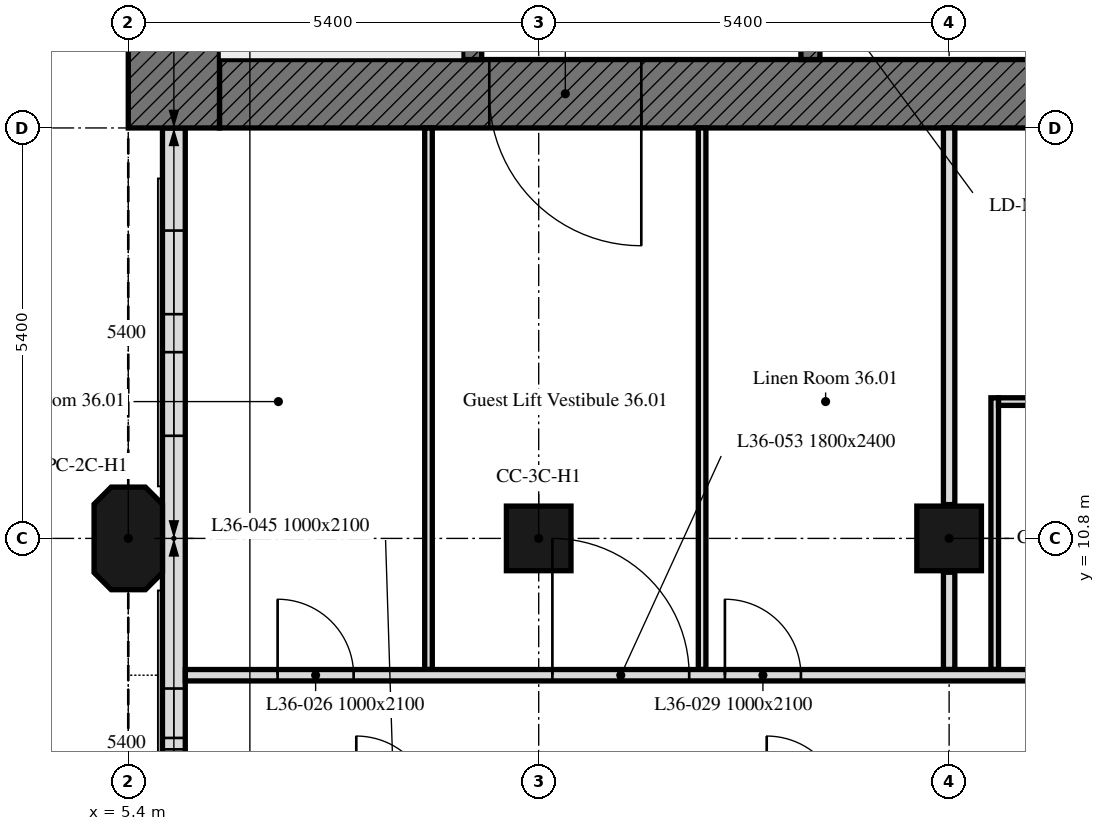
"""IFC4 building model, lengths in metres.
Left out: names, types, materials, properties, quantities, classifications, styles, units other than length and angle.
Written with IfcOpenShell. Run it as: python <this file> out.ifc"""

import sys

from ifc_helpers import new_model, si_unit, direction, frame, frame_2d, origin, origin_2d, place, context, subcontext, project, spatial, polyline, rectangle, outline, extrude, element, fill, save


model = new_model("IFC4")
c1 = context("Model", 3, precision=1e-05, world=origin(), true_north=direction((0.0, 1.0)))
c2 = subcontext(c1, "Body", "Model", "MODEL_VIEW")
j1 = project(units=[si_unit("LENGTHUNIT", "METRE"), si_unit("PLANEANGLEUNIT", "RADIAN")], contexts=[c1])
p1 = place(None, origin())
s1 = spatial("IfcSite", under=j1, at=p1, CompositionType="ELEMENT")
p2 = place(p1, origin())
s2 = spatial("IfcBuilding", under=s1, at=p2, CompositionType="ELEMENT")
p3 = place(p2, frame((0.0, 0.0, 156.1)))
s3 = spatial("IfcBuildingStorey", under=s2, at=p3, CompositionType="ELEMENT", Elevation=156.1)
p4 = place(p3, frame((5.4, 10.8, 0.0), z_axis=(0.0, 0.0, 1.0), x_axis=(0.0, 1.0, 0.0)))
e1 = element("IfcColumn", 1, at=p4, inside=s3, PredefinedType="COLUMN", context=c2, shape_type="SweptSolid", body=[
    extrude(outline(polyline([(-0.45, -0.45), (0.45, -0.45), (0.675, -0.225), (0.675, 0.225), (0.45, 0.45), (-0.45, 0.45), (-0.675, 0.225), (-0.675, -0.225), (-0.45, -0.45)])), origin(), (0.0, 0.0, 1.0), 3.0),
])
for number, where, z_axis, x_axis in (
    (2, (10.8, 10.8, 0.0), (0.0, 0.0, 1.0), (1.0, 0.0, 0.0)),
    (3, (16.2, 10.8, 0.0), (0.0, 0.0, 1.0), (1.0, 0.0, 0.0)),
):
    element("IfcColumn", number, at=place(p3, frame(where, z_axis=z_axis, x_axis=x_axis)), inside=s3, PredefinedType="COLUMN", context=c2, shape_type="SweptSolid", body=[
        extrude(rectangle(XDim=0.85, YDim=0.85, at=origin_2d()), origin(), (0.0, 0.0, 1.0), 3.0),
    ])
p5 = place(p3, frame((6.0, 16.2, 0.0), z_axis=(0.0, 0.0, 1.0), x_axis=(0.0, -1.0, 0.0)))
e4 = element("IfcWall", 4, at=p5, inside=s3, PredefinedType="SOLIDWALL", context=c2, shape_type="SweptSolid", body=[
    extrude(rectangle(XDim=10.614, YDim=0.3, at=frame_2d((5.307, 0.0))), origin(), (0.0, 0.0, 1.0), 3.0),
])
p6 = place(p5, frame((1.35, 0.0, 0.9)))
e5 = element("IfcOpeningElement", 5, at=p6, cuts=e4, PredefinedType="OPENING", context=c2, shape_type="SweptSolid", body=[
    extrude(rectangle(XDim=1.1, YDim=1.7, at=frame_2d((0.55, 0.85))), frame((0.0, 0.16, 0.0), z_axis=(0.0, -1.0, 0.0), x_axis=(1.0, 0.0, 0.0)), (0.0, 0.0, 1.0), 0.32),
])
p7 = place(p5, frame((2.95, 0.0, 0.9)))
e6 = element("IfcOpeningElement", 6, at=p7, cuts=e4, PredefinedType="OPENING", context=c2, shape_type="SweptSolid", body=[
    extrude(rectangle(XDim=1.1, YDim=1.7, at=frame_2d((0.55, 0.85))), frame((0.0, 0.16, 0.0), z_axis=(0.0, -1.0, 0.0), x_axis=(1.0, 0.0, 0.0)), (0.0, 0.0, 1.0), 0.32),
])
p8 = place(p5, frame((7.375, 0.0, 0.9)))
e7 = element("IfcOpeningElement", 7, at=p8, cuts=e4, PredefinedType="OPENING", context=c2, shape_type="SweptSolid", body=[
    extrude(rectangle(XDim=0.65, YDim=1.7, at=frame_2d((0.325, 0.85))), frame((0.0, 0.16, 0.0), z_axis=(0.0, -1.0, 0.0), x_axis=(1.0, 0.0, 0.0)), (0.0, 0.0, 1.0), 0.32),
])
p9 = place(p5, frame((8.175, 0.0, 0.9)))
e8 = element("IfcOpeningElement", 8, at=p9, cuts=e4, PredefinedType="OPENING", context=c2, shape_type="SweptSolid", body=[
    extrude(rectangle(XDim=0.65, YDim=1.7, at=frame_2d((0.325, 0.85))), frame((0.0, 0.16, 0.0), z_axis=(0.0, -1.0, 0.0), x_axis=(1.0, 0.0, 0.0)), (0.0, 0.0, 1.0), 0.32),
])
p10 = place(p3, frame((17.7, 16.65, 0.0), z_axis=(0.0, 0.0, 1.0), x_axis=(-1.0, 0.0, 0.0)))
e9 = element("IfcWall", 9, at=p10, inside=s3, PredefinedType="SOLIDWALL", context=c2, shape_type="SweptSolid", body=[
    extrude(rectangle(XDim=11.1, YDim=0.9, at=frame_2d((5.55, 0.0))), origin(), (0.0, 0.0, 1.0), 3.0),
])
p11 = place(p10, frame((5.55, 0.0, 0.0)))
e10 = element("IfcOpeningElement", 10, at=p11, cuts=e9, PredefinedType="OPENING", context=c2, shape_type="SweptSolid", body=[
    extrude(rectangle(XDim=2.0, YDim=2.4, at=frame_2d((1.0, 1.2))), frame((0.0, 0.45, 0.0), z_axis=(0.0, -1.0, 0.0), x_axis=(1.0, 0.0, 0.0)), (0.0, 0.0, 1.0), 0.9),
])
p12 = place(p3, frame((6.0, 16.2, 0.0), z_axis=(0.0, 0.0, 1.0), x_axis=(0.0, 1.0, 0.0)))
e11 = element("IfcWall", 11, at=p12, inside=s3, PredefinedType="SOLIDWALL", context=c2, shape_type="SweptSolid", body=[
    extrude(rectangle(XDim=16.2, YDim=1.2, at=frame_2d((8.1, 0.0))), origin(), (0.0, 0.0, 1.0), 3.0),
])
p13 = place(p3, frame((9.925, 17.1, 0.0), z_axis=(0.0, 0.0, 1.0), x_axis=(0.0, 1.0, 0.0)))
e12 = element("IfcWall", 12, at=p13, inside=s3, PredefinedType="SOLIDWALL", context=c2, shape_type="SweptSolid", body=[
    extrude(rectangle(XDim=14.4, YDim=0.25, at=frame_2d((7.2, 0.0))), origin(), (0.0, 0.0, 1.0), 3.0),
])
p14 = place(p13, frame((4.6, 0.0, 0.0)))
e13 = element("IfcOpeningElement", 13, at=p14, cuts=e12, PredefinedType="OPENING", context=c2, shape_type="SweptSolid", body=[
    extrude(rectangle(XDim=1.0, YDim=2.1, at=frame_2d((0.5, 1.05))), frame((0.0, 0.125, 0.0), z_axis=(0.0, -1.0, 0.0), x_axis=(1.0, 0.0, 0.0)), (0.0, 0.0, 1.0), 0.25),
])
p15 = place(p13, frame((7.062, 0.0, 0.0)))
e14 = element("IfcOpeningElement", 14, at=p15, cuts=e12, PredefinedType="OPENING", context=c2, shape_type="SweptSolid", body=[
    extrude(rectangle(XDim=1.2, YDim=2.1, at=frame_2d((0.6, 1.05))), frame((0.0, 0.125, 0.0), z_axis=(0.0, -1.0, 0.0), x_axis=(1.0, 0.0, 0.0)), (0.0, 0.0, 1.0), 0.25),
])
p16 = place(p13, frame((9.472, 0.0, 0.0)))
e15 = element("IfcOpeningElement", 15, at=p16, cuts=e12, PredefinedType="OPENING", context=c2, shape_type="SweptSolid", body=[
    extrude(rectangle(XDim=0.9, YDim=2.1, at=frame_2d((0.45, 1.05))), frame((0.0, 0.125, 0.0), z_axis=(0.0, -1.0, 0.0), x_axis=(1.0, 0.0, 0.0)), (0.0, 0.0, 1.0), 0.25),
])
p17 = place(p13, frame((11.159, 0.0, 0.0)))
e16 = element("IfcOpeningElement", 16, at=p17, cuts=e12, PredefinedType="OPENING", context=c2, shape_type="SweptSolid", body=[
    extrude(rectangle(XDim=0.9, YDim=2.1, at=frame_2d((0.45, 1.05))), frame((0.0, 0.125, 0.0), z_axis=(0.0, -1.0, 0.0), x_axis=(1.0, 0.0, 0.0)), (0.0, 0.0, 1.0), 0.25),
])
p18 = place(p13, frame((13.1, 0.0, 0.0)))
e17 = element("IfcOpeningElement", 17, at=p18, cuts=e12, PredefinedType="OPENING", context=c2, shape_type="SweptSolid", body=[
    extrude(rectangle(XDim=0.9, YDim=2.1, at=frame_2d((0.45, 1.05))), frame((0.0, 0.125, 0.0), z_axis=(0.0, -1.0, 0.0), x_axis=(1.0, 0.0, 0.0)), (0.0, 0.0, 1.0), 0.25),
])
p19 = place(p3, frame((14.375, 17.1, 0.0), z_axis=(0.0, 0.0, 1.0), x_axis=(0.0, 1.0, 0.0)))
e18 = element("IfcWall", 18, at=p19, inside=s3, PredefinedType="SOLIDWALL", context=c2, shape_type="SweptSolid", body=[
    extrude(rectangle(XDim=14.4, YDim=0.25, at=frame_2d((7.2, 0.0))), origin(), (0.0, 0.0, 1.0), 3.0),
])
p20 = place(p19, frame((13.15, 0.0, 0.0)))
e19 = element("IfcOpeningElement", 19, at=p20, cuts=e18, PredefinedType="OPENING", context=c2, shape_type="SweptSolid", body=[
    extrude(rectangle(XDim=1.0, YDim=2.1, at=frame_2d((0.5, 1.05))), frame((0.0, 0.125, 0.0), z_axis=(0.0, -1.0, 0.0), x_axis=(1.0, 0.0, 0.0)), (0.0, 0.0, 1.0), 0.25),
])
p21 = place(p19, frame((0.6, 0.0, 0.0)))
e20 = element("IfcOpeningElement", 20, at=p21, cuts=e18, PredefinedType="OPENING", context=c2, shape_type="SweptSolid", body=[
    extrude(rectangle(XDim=1.1, YDim=2.1, at=frame_2d((0.55, 1.05))), frame((0.0, 0.125, 0.0), z_axis=(0.0, -1.0, 0.0), x_axis=(1.0, 0.0, 0.0)), (0.0, 0.0, 1.0), 0.25),
])
p22 = place(p19, frame((3.25, 0.0, 0.0)))
e21 = element("IfcOpeningElement", 21, at=p22, cuts=e18, PredefinedType="OPENING", context=c2, shape_type="SweptSolid", body=[
    extrude(rectangle(XDim=0.9, YDim=2.1, at=frame_2d((0.45, 1.05))), frame((0.0, 0.125, 0.0), z_axis=(0.0, -1.0, 0.0), x_axis=(1.0, 0.0, 0.0)), (0.0, 0.0, 1.0), 0.25),
])
p23 = place(p3, frame((16.2, 16.2, 0.0), z_axis=(0.0, 0.0, 1.0), x_axis=(0.0, -1.0, 0.0)))
e22 = element("IfcWall", 22, at=p23, inside=s3, PredefinedType="PARTITIONING", context=c2, shape_type="SweptSolid", body=[
    extrude(rectangle(XDim=4.955, YDim=0.15, at=frame_2d((2.478, 0.0))), origin(), (0.0, 0.0, 1.0), 2.4),
])
p24 = place(p3, frame((16.2, 10.355, 0.0), z_axis=(0.0, 0.0, 1.0), x_axis=(0.0, -1.0, 0.0)))
e23 = element("IfcWall", 23, at=p24, inside=s3, PredefinedType="PARTITIONING", context=c2, shape_type="SweptSolid", body=[
    extrude(rectangle(XDim=1.28, YDim=0.15, at=frame_2d((0.64, 0.0))), origin(), (0.0, 0.0, 1.0), 2.4),
])
p25 = place(p3, frame((16.8, 9.075, 0.0), z_axis=(0.0, 0.0, 1.0), x_axis=(0.0, 1.0, 0.0)))
e24 = element("IfcWall", 24, at=p25, inside=s3, PredefinedType="PARTITIONING", context=c2, shape_type="SweptSolid", body=[
    extrude(rectangle(XDim=3.575, YDim=0.1, at=frame_2d((1.788, 0.0))), origin(), (0.0, 0.0, 1.0), 3.0),
])
p26 = place(p3, frame((16.85, 12.6, 0.0), z_axis=(0.0, 0.0, 1.0), x_axis=(1.0, 0.0, 0.0)))
e25 = element("IfcWall", 25, at=p26, inside=s3, PredefinedType="PARTITIONING", context=c2, shape_type="SweptSolid", body=[
    extrude(rectangle(XDim=2.1, YDim=0.1, at=frame_2d((1.05, 0.0))), origin(), (0.0, 0.0, 1.0), 3.0),
])
for number, where, z_axis, x_axis in (
    (26, (9.35, 16.2, 0.0), (0.0, 0.0, 1.0), (0.0, -1.0, 0.0)),
    (27, (12.95, 9.075, 0.0), (0.0, 0.0, 1.0), (0.0, 1.0, 0.0)),
):
    element("IfcWall", number, at=place(p3, frame(where, z_axis=z_axis, x_axis=x_axis)), inside=s3, PredefinedType="PARTITIONING", context=c2, shape_type="SweptSolid", body=[
        extrude(rectangle(XDim=7.125, YDim=0.1, at=frame_2d((3.562, 0.0))), origin(), (0.0, 0.0, 1.0), 3.0),
    ])
p27 = place(p3, frame((6.151, 9.0, 0.0), z_axis=(0.0, 0.0, 1.0), x_axis=(1.0, 0.0, 0.0)))
e28 = element("IfcWall", 28, at=p27, inside=s3, PredefinedType="PARTITIONING", context=c2, shape_type="SweptSolid", body=[
    extrude(rectangle(XDim=36.974, YDim=0.15, at=frame_2d((18.487, 0.0))), origin(), (0.0, 0.0, 1.0), 2.4),
])
p28 = place(p27, frame((1.214, 0.0, 0.0)))
e29 = element("IfcOpeningElement", 29, at=p28, cuts=e28, PredefinedType="OPENING", context=c2, shape_type="SweptSolid", body=[
    extrude(rectangle(XDim=1.0, YDim=2.1, at=frame_2d((0.5, 1.05))), frame((0.0, 0.075, 0.0), z_axis=(0.0, -1.0, 0.0), x_axis=(1.0, 0.0, 0.0)), (0.0, 0.0, 1.0), 0.15),
])
p29 = place(p27, frame((28.199, 0.0, 0.0)))
e30 = element("IfcOpeningElement", 30, at=p29, cuts=e28, PredefinedType="OPENING", context=c2, shape_type="SweptSolid", body=[
    extrude(rectangle(XDim=1.0, YDim=2.1, at=frame_2d((0.5, 1.05))), frame((0.0, 0.075, 0.0), z_axis=(0.0, -1.0, 0.0), x_axis=(1.0, 0.0, 0.0)), (0.0, 0.0, 1.0), 0.15),
])
p30 = place(p27, frame((7.099, 0.0, 0.0)))
e31 = element("IfcOpeningElement", 31, at=p30, cuts=e28, PredefinedType="OPENING", context=c2, shape_type="SweptSolid", body=[
    extrude(rectangle(XDim=1.0, YDim=2.1, at=frame_2d((0.5, 1.05))), frame((0.0, 0.075, 0.0), z_axis=(0.0, -1.0, 0.0), x_axis=(1.0, 0.0, 0.0)), (0.0, 0.0, 1.0), 0.15),
])
p31 = place(p27, frame((13.049, 0.0, 0.0)))
e32 = element("IfcOpeningElement", 32, at=p31, cuts=e28, PredefinedType="OPENING", context=c2, shape_type="SweptSolid", body=[
    extrude(rectangle(XDim=1.0, YDim=2.1, at=frame_2d((0.5, 1.05))), frame((0.0, 0.075, 0.0), z_axis=(0.0, -1.0, 0.0), x_axis=(1.0, 0.0, 0.0)), (0.0, 0.0, 1.0), 0.15),
])
p32 = place(p27, frame((16.849, 0.0, 0.0)))
e33 = element("IfcOpeningElement", 33, at=p32, cuts=e28, PredefinedType="OPENING", context=c2, shape_type="SweptSolid", body=[
    extrude(rectangle(XDim=1.0, YDim=2.1, at=frame_2d((0.5, 1.05))), frame((0.0, 0.075, 0.0), z_axis=(0.0, -1.0, 0.0), x_axis=(1.0, 0.0, 0.0)), (0.0, 0.0, 1.0), 0.15),
])
p33 = place(p27, frame((23.849, 0.0, 0.0)))
e34 = element("IfcOpeningElement", 34, at=p33, cuts=e28, PredefinedType="OPENING", context=c2, shape_type="SweptSolid", body=[
    extrude(rectangle(XDim=1.0, YDim=2.1, at=frame_2d((0.5, 1.05))), frame((0.0, 0.075, 0.0), z_axis=(0.0, -1.0, 0.0), x_axis=(1.0, 0.0, 0.0)), (0.0, 0.0, 1.0), 0.15),
])
p34 = place(p27, frame((4.829, 0.0, 0.0)))
e35 = element("IfcOpeningElement", 35, at=p34, cuts=e28, PredefinedType="OPENING", context=c2, shape_type="SweptSolid", body=[
    extrude(rectangle(XDim=1.8, YDim=2.4, at=frame_2d((0.9, 1.2))), frame((0.0, 0.075, 0.0), z_axis=(0.0, -1.0, 0.0), x_axis=(1.0, 0.0, 0.0)), (0.0, 0.0, 1.0), 0.15),
])
p35 = place(p27, frame((30.199, 0.0, 0.0)))
e36 = element("IfcOpeningElement", 36, at=p35, cuts=e28, PredefinedType="OPENING", context=c2, shape_type="SweptSolid", body=[
    extrude(rectangle(XDim=1.0, YDim=2.1, at=frame_2d((0.5, 1.05))), frame((0.0, 0.075, 0.0), z_axis=(0.0, -1.0, 0.0), x_axis=(1.0, 0.0, 0.0)), (0.0, 0.0, 1.0), 0.15),
])
p36 = place(p6, origin())
e37 = element("IfcWindow", 37, at=p36, inside=s3, PartitioningType="SINGLE_PANEL", PredefinedType="WINDOW", context=c2, shape_type="SweptSolid", body=[
    extrude(rectangle(XDim=1.1, YDim=1.7, at=frame_2d((0.55, 0.85))), frame((0.0, 0.03, 0.0), z_axis=(0.0, -1.0, 0.0), x_axis=(1.0, 0.0, 0.0)), (0.0, 0.0, 1.0), 0.06),
])
fill(e5, e37)
p37 = place(p7, origin())
e38 = element("IfcWindow", 38, at=p37, inside=s3, PartitioningType="SINGLE_PANEL", PredefinedType="WINDOW", context=c2, shape_type="SweptSolid", body=[
    extrude(rectangle(XDim=1.1, YDim=1.7, at=frame_2d((0.55, 0.85))), frame((0.0, 0.03, 0.0), z_axis=(0.0, -1.0, 0.0), x_axis=(1.0, 0.0, 0.0)), (0.0, 0.0, 1.0), 0.06),
])
fill(e6, e38)
p38 = place(p8, origin())
e39 = element("IfcWindow", 39, at=p38, inside=s3, PartitioningType="SINGLE_PANEL", PredefinedType="WINDOW", context=c2, shape_type="SweptSolid", body=[
    extrude(rectangle(XDim=0.65, YDim=1.7, at=frame_2d((0.325, 0.85))), frame((0.0, 0.03, 0.0), z_axis=(0.0, -1.0, 0.0), x_axis=(1.0, 0.0, 0.0)), (0.0, 0.0, 1.0), 0.06),
])
fill(e7, e39)
p39 = place(p9, origin())
e40 = element("IfcWindow", 40, at=p39, inside=s3, PartitioningType="SINGLE_PANEL", PredefinedType="WINDOW", context=c2, shape_type="SweptSolid", body=[
    extrude(rectangle(XDim=0.65, YDim=1.7, at=frame_2d((0.325, 0.85))), frame((0.0, 0.03, 0.0), z_axis=(0.0, -1.0, 0.0), x_axis=(1.0, 0.0, 0.0)), (0.0, 0.0, 1.0), 0.06),
])
fill(e8, e40)
p40 = place(p11, origin())
e41 = element("IfcDoor", 41, at=p40, inside=s3, OperationType="DOUBLE_DOOR_SINGLE_SWING", PredefinedType="DOOR", context=c2, shape_type="SweptSolid", body=[
    extrude(rectangle(XDim=2.0, YDim=2.4, at=frame_2d((1.0, 1.2))), frame((0.0, 0.025, 0.0), z_axis=(0.0, -1.0, 0.0), x_axis=(1.0, 0.0, 0.0)), (0.0, 0.0, 1.0), 0.05),
])
fill(e10, e41)
p41 = place(p28, origin())
e42 = element("IfcDoor", 42, at=p41, inside=s3, OperationType="SINGLE_SWING_RIGHT", PredefinedType="DOOR", context=c2, shape_type="SweptSolid", body=[
    extrude(rectangle(XDim=1.0, YDim=2.1, at=frame_2d((0.5, 1.05))), frame((0.0, 0.025, 0.0), z_axis=(0.0, -1.0, 0.0), x_axis=(1.0, 0.0, 0.0)), (0.0, 0.0, 1.0), 0.05),
])
fill(e29, e42)
p42 = place(p30, origin())
e43 = element("IfcDoor", 43, at=p42, inside=s3, OperationType="SINGLE_SWING_LEFT", PredefinedType="DOOR", context=c2, shape_type="SweptSolid", body=[
    extrude(rectangle(XDim=1.0, YDim=2.1, at=frame_2d((0.5, 1.05))), frame((0.0, 0.025, 0.0), z_axis=(0.0, -1.0, 0.0), x_axis=(1.0, 0.0, 0.0)), (0.0, 0.0, 1.0), 0.05),
])
fill(e31, e43)
p43 = place(p34, origin())
e44 = element("IfcDoor", 44, at=p43, inside=s3, OperationType="DOUBLE_DOOR_SINGLE_SWING", PredefinedType="DOOR", context=c2, shape_type="SweptSolid", body=[
    extrude(rectangle(XDim=1.8, YDim=2.4, at=frame_2d((0.9, 1.2))), frame((0.0, 0.025, 0.0), z_axis=(0.0, -1.0, 0.0), x_axis=(1.0, 0.0, 0.0)), (0.0, 0.0, 1.0), 0.05),
])
fill(e35, e44)
save(model, sys.argv[1])
